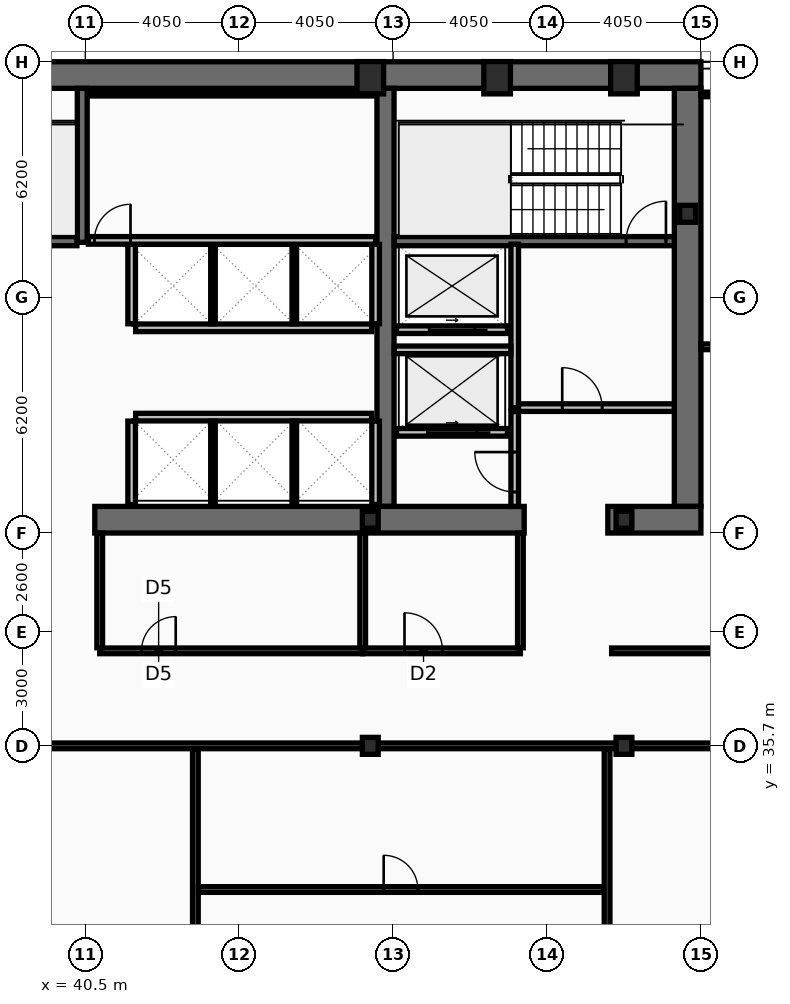
"""IFC4 building model, lengths in metres.
Left out: names, types, materials, properties, quantities, classifications, styles, units other than length and angle.
Written with IfcOpenShell. Run it as: python <this file> out.ifc"""

import sys

from ifc_helpers import new_model, si_unit, direction, frame, frame_2d, origin, origin_2d, place, context, subcontext, project, spatial, rectangle, hollow_rectangle, i_section, extrude, element, fill, save


model = new_model("IFC4")
c1 = context("Model", 3, precision=1e-05, world=origin(), true_north=direction((0.0, 1.0)))
c2 = subcontext(c1, "Body", "Model", "MODEL_VIEW")
j1 = project(units=[si_unit("LENGTHUNIT", "METRE"), si_unit("PLANEANGLEUNIT", "RADIAN")], contexts=[c1])
p1 = place(None, origin())
s1 = spatial("IfcSite", under=j1, at=p1, CompositionType="ELEMENT")
p2 = place(p1, origin())
s2 = spatial("IfcBuilding", under=s1, at=p2, CompositionType="ELEMENT")
p3 = place(p2, frame((0.0, 0.0, 136.2)))
s3 = spatial("IfcBuildingStorey", under=s2, at=p3, CompositionType="ELEMENT", Elevation=136.2)
p4 = place(p3, frame((16.2, 53.35, 0.0), z_axis=(0.0, 0.0, 1.0), x_axis=(1.0, 0.0, 0.0)))
e1 = element("IfcWall", 1, at=p4, inside=s3, PredefinedType="SHEAR", context=c2, shape_type="SweptSolid", body=[
    extrude(rectangle(XDim=40.5, YDim=0.7, at=frame_2d((20.25, 0.0))), origin(), (0.0, 0.0, 1.0), 3.44),
])
p5 = place(p3, frame((56.35, 53.0, 0.0), z_axis=(0.0, 0.0, 1.0), x_axis=(0.0, -1.0, 0.0)))
e2 = element("IfcWall", 2, at=p5, inside=s3, PredefinedType="SHEAR", context=c2, shape_type="SweptSolid", body=[
    extrude(rectangle(XDim=11.0, YDim=0.7, at=frame_2d((5.5, 0.0))), origin(), (0.0, 0.0, 1.0), 3.44),
])
p6 = place(p3, frame((48.4, 42.0, 0.0), z_axis=(0.0, 0.0, 1.0), x_axis=(0.0, 1.0, 0.0)))
e3 = element("IfcWall", 3, at=p6, inside=s3, PredefinedType="SHEAR", context=c2, shape_type="SweptSolid", body=[
    extrude(rectangle(XDim=11.0, YDim=0.45, at=frame_2d((5.5, 0.0))), origin(), (0.0, 0.0, 1.0), 3.44),
])
p7 = place(p3, frame((52.05, 41.65, 0.0), z_axis=(0.0, 0.0, 1.0), x_axis=(-1.0, 0.0, 0.0)))
e4 = element("IfcWall", 4, at=p7, inside=s3, PredefinedType="SHEAR", context=c2, shape_type="SweptSolid", body=[
    extrude(rectangle(XDim=11.3, YDim=0.7, at=frame_2d((5.65, 0.0))), origin(), (0.0, 0.0, 1.0), 3.44),
])
p8 = place(p3, frame((56.7, 41.65, 0.0), z_axis=(0.0, 0.0, 1.0), x_axis=(-1.0, 0.0, 0.0)))
e5 = element("IfcWall", 5, at=p8, inside=s3, PredefinedType="SHEAR", context=c2, shape_type="SweptSolid", body=[
    extrude(rectangle(XDim=2.45, YDim=0.7, at=frame_2d((1.225, 0.0))), origin(), (0.0, 0.0, 1.0), 3.44),
])
p9 = place(p3, frame((40.42, 48.95, 0.0), z_axis=(0.0, 0.0, 1.0), x_axis=(0.0, 1.0, 0.0)))
e6 = element("IfcWall", 6, at=p9, inside=s3, PredefinedType="SHEAR", context=c2, shape_type="SweptSolid", body=[
    extrude(rectangle(XDim=4.05, YDim=0.26, at=frame_2d((2.025, 0.0))), origin(), (0.0, 0.0, 1.0), 3.44),
])
p10 = place(p3, frame((48.63, 48.98, 0.0), z_axis=(0.0, 0.0, 1.0), x_axis=(1.0, 0.0, 0.0)))
e7 = element("IfcWall", 7, at=p10, inside=s3, PredefinedType="SHEAR", context=c2, shape_type="SweptSolid", body=[
    extrude(rectangle(XDim=7.37, YDim=0.24, at=frame_2d((3.685, 0.0))), origin(), (0.0, 0.0, 1.0), 3.44),
])
p11 = place(p10, frame((6.1, 0.0, 0.0)))
e8 = element("IfcOpeningElement", 8, at=p11, cuts=e7, PredefinedType="OPENING", context=c2, shape_type="SweptSolid", body=[
    extrude(rectangle(XDim=1.05, YDim=2.15, at=frame_2d((0.525, 1.075))), frame((0.0, 0.13, 0.0), z_axis=(0.0, -1.0, 0.0), x_axis=(1.0, 0.0, 0.0)), (0.0, 0.0, 1.0), 0.26),
])
p12 = place(p3, frame((32.72, 48.98, 0.0), z_axis=(0.0, 0.0, 1.0), x_axis=(1.0, 0.0, 0.0)))
e9 = element("IfcWall", 9, at=p12, inside=s3, PredefinedType="SHEAR", context=c2, shape_type="SweptSolid", body=[
    extrude(rectangle(XDim=7.56, YDim=0.24, at=frame_2d((3.78, 0.0))), origin(), (0.0, 0.0, 1.0), 3.44),
])
p13 = place(p12, frame((0.22, 0.0, 0.0)))
e10 = element("IfcOpeningElement", 10, at=p13, cuts=e9, PredefinedType="OPENING", context=c2, shape_type="SweptSolid", body=[
    extrude(rectangle(XDim=1.05, YDim=2.15, at=frame_2d((0.525, 1.075))), frame((0.0, 0.13, 0.0), z_axis=(0.0, -1.0, 0.0), x_axis=(1.0, 0.0, 0.0)), (0.0, 0.0, 1.0), 0.26),
])
for number, where, z_axis, x_axis in (
    (11, (48.0, 53.28, 0.0), (0.0, 0.0, 1.0), (1.0, 0.0, 0.0)),
    (12, (51.337, 53.28, 0.0), (0.0, 0.0, 1.0), (1.0, 0.0, 0.0)),
    (13, (54.675, 53.28, 0.0), (0.0, 0.0, 1.0), (1.0, 0.0, 0.0)),
):
    element("IfcColumn", number, at=place(p3, frame(where, z_axis=z_axis, x_axis=x_axis)), inside=s3, PredefinedType="COLUMN", context=c2, shape_type="SweptSolid", body=[
        extrude(hollow_rectangle(XDim=0.7, YDim=0.85, WallThickness=0.05, at=origin_2d()), origin(), (0.0, 0.0, 1.0), 3.6),
    ])
for number, where, z_axis, x_axis in (
    (14, (56.35, 49.7, 0.0), (0.0, 0.0, 1.0), (1.0, 0.0, 0.0)),
    (15, (48.0, 35.7, 0.0), (0.0, 0.0, 1.0), (1.0, 0.0, 0.0)),
    (16, (48.0, 41.65, 0.0), (0.0, 0.0, 1.0), (1.0, 0.0, 0.0)),
    (17, (54.675, 35.7, 0.0), (0.0, 0.0, 1.0), (1.0, 0.0, 0.0)),
    (18, (54.675, 41.65, 0.0), (0.0, 0.0, 1.0), (1.0, 0.0, 0.0)),
):
    element("IfcColumn", number, at=place(p3, frame(where, z_axis=z_axis, x_axis=x_axis)), inside=s3, PredefinedType="COLUMN", context=c2, shape_type="SweptSolid", body=[
        extrude(i_section(OverallWidth=0.416, OverallDepth=0.446, WebThickness=0.039, FlangeThickness=0.063, at=origin_2d()), origin(), (0.0, 0.0, 1.0), 3.6),
    ])
p14 = place(p3, frame((51.61, 43.95, 0.0), z_axis=(0.0, 0.0, 1.0), x_axis=(-1.0, 0.0, 0.0)))
e19 = element("IfcWall", 19, at=p14, inside=s3, PredefinedType="PARTITIONING", context=c2, shape_type="SweptSolid", body=[
    extrude(rectangle(XDim=2.92, YDim=0.2, at=frame_2d((1.46, 0.0))), origin(), (0.0, 0.0, 1.0), 3.44),
])
p15 = place(p14, frame((0.81, 0.0, 0.0)))
e20 = element("IfcOpeningElement", 20, at=p15, cuts=e19, PredefinedType="OPENING", context=c2, shape_type="SweptSolid", body=[
    extrude(rectangle(XDim=1.3, YDim=2.18, at=frame_2d((0.65, 1.09))), frame((0.0, 0.11, 0.0), z_axis=(0.0, -1.0, 0.0), x_axis=(1.0, 0.0, 0.0)), (0.0, 0.0, 1.0), 0.22),
])
p16 = place(p3, frame((51.61, 46.65, 0.0), z_axis=(0.0, 0.0, 1.0), x_axis=(-1.0, 0.0, 0.0)))
e21 = element("IfcWall", 21, at=p16, inside=s3, PredefinedType="PARTITIONING", context=c2, shape_type="SweptSolid", body=[
    extrude(rectangle(XDim=2.92, YDim=0.2, at=frame_2d((1.46, 0.0))), origin(), (0.0, 0.0, 1.0), 3.44),
])
p17 = place(p16, frame((0.86, 0.0, 0.0)))
e22 = element("IfcOpeningElement", 22, at=p17, cuts=e21, PredefinedType="OPENING", context=c2, shape_type="SweptSolid", body=[
    extrude(rectangle(XDim=1.2, YDim=2.18, at=frame_2d((0.6, 1.09))), frame((0.0, 0.11, 0.0), z_axis=(0.0, -1.0, 0.0), x_axis=(1.0, 0.0, 0.0)), (0.0, 0.0, 1.0), 0.22),
])
p18 = place(p3, frame((51.8, 44.6, 0.0), z_axis=(0.0, 0.0, 1.0), x_axis=(0.0, 1.0, 0.0)))
e23 = element("IfcWall", 23, at=p18, inside=s3, PredefinedType="PARTITIONING", context=c2, shape_type="SweptSolid", body=[
    extrude(rectangle(XDim=4.3, YDim=0.2, at=frame_2d((2.15, 0.0))), origin(), (0.0, 0.0, 1.0), 3.44),
])
p19 = place(p3, frame((51.9, 44.6, 0.0), z_axis=(0.0, 0.0, 1.0), x_axis=(1.0, 0.0, 0.0)))
e24 = element("IfcWall", 24, at=p19, inside=s3, PredefinedType="PARTITIONING", context=c2, shape_type="SweptSolid", body=[
    extrude(rectangle(XDim=4.1, YDim=0.2, at=frame_2d((2.05, 0.0))), origin(), (0.0, 0.0, 1.0), 3.44),
])
p20 = place(p19, frame((1.15, 0.0, 0.0)))
e25 = element("IfcOpeningElement", 25, at=p20, cuts=e24, PredefinedType="OPENING", context=c2, shape_type="SweptSolid", body=[
    extrude(rectangle(XDim=1.05, YDim=2.15, at=frame_2d((0.525, 1.075))), frame((0.0, 0.11, 0.0), z_axis=(0.0, -1.0, 0.0), x_axis=(1.0, 0.0, 0.0)), (0.0, 0.0, 1.0), 0.22),
])
p21 = place(p3, frame((48.63, 46.12, 0.0), z_axis=(0.0, 0.0, 1.0), x_axis=(1.0, 0.0, 0.0)))
e26 = element("IfcWall", 26, at=p21, inside=s3, PredefinedType="PARTITIONING", context=c2, shape_type="SweptSolid", body=[
    extrude(rectangle(XDim=3.07, YDim=0.2, at=frame_2d((1.535, 0.0))), origin(), (0.0, 0.0, 1.0), 3.44),
])
p22 = place(p3, frame((51.8, 42.0, 0.0), z_axis=(0.0, 0.0, 1.0), x_axis=(0.0, 1.0, 0.0)))
e27 = element("IfcWall", 27, at=p22, inside=s3, PredefinedType="PARTITIONING", context=c2, shape_type="SweptSolid", body=[
    extrude(rectangle(XDim=2.495, YDim=0.2, at=frame_2d((1.248, 0.0))), origin(), (0.0, 0.0, 1.0), 3.44),
])
p23 = place(p22, frame((0.38, 0.0, 0.0)))
e28 = element("IfcOpeningElement", 28, at=p23, cuts=e27, PredefinedType="OPENING", context=c2, shape_type="SweptSolid", body=[
    extrude(rectangle(XDim=1.05, YDim=2.15, at=frame_2d((0.525, 1.075))), frame((0.0, 0.11, 0.0), z_axis=(0.0, -1.0, 0.0), x_axis=(1.0, 0.0, 0.0)), (0.0, 0.0, 1.0), 0.22),
])
p24 = place(p3, frame((41.825, 46.7, 0.0), z_axis=(0.0, 0.0, 1.0), x_axis=(1.0, 0.0, 0.0)))
e29 = element("IfcWall", 29, at=p24, inside=s3, PredefinedType="PARTITIONING", context=c2, shape_type="SweptSolid", body=[
    extrude(rectangle(XDim=6.21, YDim=0.2, at=frame_2d((3.105, 0.0))), origin(), (0.0, 0.0, 1.0), 3.44),
])
for number, where, z_axis, x_axis in (
    (30, (41.72, 46.805, 0.0), (0.0, 0.0, 1.0), (0.0, 1.0, 0.0)),
    (31, (48.14, 46.805, 0.0), (0.0, 0.0, 1.0), (0.0, 1.0, 0.0)),
):
    element("IfcWall", number, at=place(p3, frame(where, z_axis=z_axis, x_axis=x_axis)), inside=s3, PredefinedType="PARTITIONING", context=c2, shape_type="SweptSolid", body=[
        extrude(rectangle(XDim=2.09, YDim=0.2, at=frame_2d((1.045, 0.0))), origin(), (0.0, 0.0, 1.0), 3.44),
    ])
for number, where, z_axis, x_axis in (
    (32, (43.86, 46.805, 0.0), (0.0, 0.0, 1.0), (0.0, 1.0, 0.0)),
    (33, (46.0, 46.805, 0.0), (0.0, 0.0, 1.0), (0.0, 1.0, 0.0)),
):
    element("IfcWall", number, at=place(p3, frame(where, z_axis=z_axis, x_axis=x_axis)), inside=s3, PredefinedType="PARTITIONING", context=c2, shape_type="SweptSolid", body=[
        extrude(rectangle(XDim=2.09, YDim=0.12, at=frame_2d((1.045, 0.0))), origin(), (0.0, 0.0, 1.0), 3.44),
    ])
p25 = place(p3, frame((41.825, 44.35, 0.0), z_axis=(0.0, 0.0, 1.0), x_axis=(1.0, 0.0, 0.0)))
e34 = element("IfcWall", 34, at=p25, inside=s3, PredefinedType="PARTITIONING", context=c2, shape_type="SweptSolid", body=[
    extrude(rectangle(XDim=6.21, YDim=0.2, at=frame_2d((3.105, 0.0))), origin(), (0.0, 0.0, 1.0), 3.44),
])
for number, where, z_axis, x_axis in (
    (35, (41.72, 42.05, 0.0), (0.0, 0.0, 1.0), (0.0, 1.0, 0.0)),
    (36, (48.14, 42.05, 0.0), (0.0, 0.0, 1.0), (0.0, 1.0, 0.0)),
):
    element("IfcWall", number, at=place(p3, frame(where, z_axis=z_axis, x_axis=x_axis)), inside=s3, PredefinedType="PARTITIONING", context=c2, shape_type="SweptSolid", body=[
        extrude(rectangle(XDim=2.195, YDim=0.2, at=frame_2d((1.098, 0.0))), origin(), (0.0, 0.0, 1.0), 3.44),
    ])
for number, where, z_axis, x_axis in (
    (37, (43.86, 42.05, 0.0), (0.0, 0.0, 1.0), (0.0, 1.0, 0.0)),
    (38, (46.0, 42.05, 0.0), (0.0, 0.0, 1.0), (0.0, 1.0, 0.0)),
):
    element("IfcWall", number, at=place(p3, frame(where, z_axis=z_axis, x_axis=x_axis)), inside=s3, PredefinedType="PARTITIONING", context=c2, shape_type="SweptSolid", body=[
        extrude(rectangle(XDim=2.195, YDim=0.12, at=frame_2d((1.098, 0.0))), origin(), (0.0, 0.0, 1.0), 3.44),
    ])
p26 = place(p3, frame((40.58, 52.86, 0.0), z_axis=(0.0, 0.0, 1.0), x_axis=(1.0, 0.0, 0.0)))
e39 = element("IfcWall", 39, at=p26, inside=s3, PredefinedType="PARTITIONING", context=c2, shape_type="SweptSolid", body=[
    extrude(rectangle(XDim=7.56, YDim=0.12, at=frame_2d((3.78, 0.0))), origin(), (0.0, 0.0, 1.0), 3.44),
])
p27 = place(p3, frame((40.58, 49.0, 0.0), z_axis=(0.0, 0.0, 1.0), x_axis=(1.0, 0.0, 0.0)))
e40 = element("IfcWall", 40, at=p27, inside=s3, PredefinedType="PARTITIONING", context=c2, shape_type="SweptSolid", body=[
    extrude(rectangle(XDim=7.56, YDim=0.2, at=frame_2d((3.78, 0.0))), origin(), (0.0, 0.0, 1.0), 3.44),
])
p28 = place(p27, frame((0.16, 0.0, 0.0)))
e41 = element("IfcOpeningElement", 41, at=p28, cuts=e40, PredefinedType="OPENING", context=c2, shape_type="SweptSolid", body=[
    extrude(rectangle(XDim=0.95, YDim=2.1, at=frame_2d((0.475, 1.05))), frame((0.0, 0.11, 0.0), z_axis=(0.0, -1.0, 0.0), x_axis=(1.0, 0.0, 0.0)), (0.0, 0.0, 1.0), 0.22),
])
p29 = place(p3, frame((40.88, 38.2, 0.0), z_axis=(0.0, 0.0, 1.0), x_axis=(1.0, 0.0, 0.0)))
e42 = element("IfcWall", 42, at=p29, inside=s3, PredefinedType="PARTITIONING", context=c2, shape_type="SweptSolid", body=[
    extrude(rectangle(XDim=6.92, YDim=0.15, at=frame_2d((3.46, 0.0))), origin(), (0.0, 0.0, 1.0), 2.73),
])
p30 = place(p29, frame((1.1, 0.0, 0.0)))
e43 = element("IfcOpeningElement", 43, at=p30, cuts=e42, PredefinedType="OPENING", context=c2, shape_type="SweptSolid", body=[
    extrude(rectangle(XDim=0.9, YDim=2.05, at=frame_2d((0.45, 1.025))), frame((0.0, 0.085, 0.0), z_axis=(0.0, -1.0, 0.0), x_axis=(1.0, 0.0, 0.0)), (0.0, 0.0, 1.0), 0.17),
])
p31 = place(p3, frame((47.8, 38.2, 0.0), z_axis=(0.0, 0.0, 1.0), x_axis=(1.0, 0.0, 0.0)))
e44 = element("IfcWall", 44, at=p31, inside=s3, PredefinedType="PARTITIONING", context=c2, shape_type="SweptSolid", body=[
    extrude(rectangle(XDim=4.15, YDim=0.15, at=frame_2d((2.075, 0.0))), origin(), (0.0, 0.0, 1.0), 2.73),
])
p32 = place(p31, frame((1.1, 0.0, 0.0)))
e45 = element("IfcOpeningElement", 45, at=p32, cuts=e44, PredefinedType="OPENING", context=c2, shape_type="SweptSolid", body=[
    extrude(rectangle(XDim=1.0, YDim=2.05, at=frame_2d((0.5, 1.025))), frame((0.0, 0.085, 0.0), z_axis=(0.0, -1.0, 0.0), x_axis=(1.0, 0.0, 0.0)), (0.0, 0.0, 1.0), 0.17),
])
p33 = place(p3, frame((40.88, 38.28, 0.0), z_axis=(0.0, 0.0, 1.0), x_axis=(0.0, 1.0, 0.0)))
e46 = element("IfcWall", 46, at=p33, inside=s3, PredefinedType="PARTITIONING", context=c2, shape_type="SweptSolid", body=[
    extrude(rectangle(XDim=3.02, YDim=0.15, at=frame_2d((1.51, 0.0))), origin(), (0.0, 0.0, 1.0), 3.44),
])
p34 = place(p3, frame((47.8, 38.28, 0.0), z_axis=(0.0, 0.0, 1.0), x_axis=(0.0, 1.0, 0.0)))
e47 = element("IfcWall", 47, at=p34, inside=s3, PredefinedType="PARTITIONING", context=c2, shape_type="SweptSolid", body=[
    extrude(rectangle(XDim=3.02, YDim=0.15, at=frame_2d((1.51, 0.0))), origin(), (0.0, 0.0, 1.0), 2.73),
])
p35 = place(p3, frame((51.95, 38.28, 0.0), z_axis=(0.0, 0.0, 1.0), x_axis=(0.0, 1.0, 0.0)))
e48 = element("IfcWall", 48, at=p35, inside=s3, PredefinedType="PARTITIONING", context=c2, shape_type="SweptSolid", body=[
    extrude(rectangle(XDim=3.02, YDim=0.15, at=frame_2d((1.51, 0.0))), origin(), (0.0, 0.0, 1.0), 3.44),
])
p36 = place(p3, frame((54.35, 38.2, 0.0), z_axis=(0.0, 0.0, 1.0), x_axis=(1.0, 0.0, 0.0)))
e49 = element("IfcWall", 49, at=p36, inside=s3, PredefinedType="PARTITIONING", context=c2, shape_type="SweptSolid", body=[
    extrude(rectangle(XDim=12.52, YDim=0.15, at=frame_2d((6.26, 0.0))), origin(), (0.0, 0.0, 1.0), 2.73),
])
p37 = place(p36, frame((3.25, 0.0, 0.0)))
e50 = element("IfcOpeningElement", 50, at=p37, cuts=e49, PredefinedType="OPENING", context=c2, shape_type="SweptSolid", body=[
    extrude(rectangle(XDim=0.95, YDim=2.05, at=frame_2d((0.475, 1.025))), frame((0.0, 0.085, 0.0), z_axis=(0.0, -1.0, 0.0), x_axis=(1.0, 0.0, 0.0)), (0.0, 0.0, 1.0), 0.17),
])
p38 = place(p3, frame((56.7, 46.2, 0.0), z_axis=(0.0, 0.0, 1.0), x_axis=(1.0, 0.0, 0.0)))
e51 = element("IfcWall", 51, at=p38, inside=s3, PredefinedType="PARTITIONING", context=c2, shape_type="SweptSolid", body=[
    extrude(rectangle(XDim=10.105, YDim=0.15, at=frame_2d((5.052, 0.0))), origin(), (0.0, 0.0, 1.0), 2.83),
])
p39 = place(p38, frame((0.9, 0.0, 0.0)))
e52 = element("IfcOpeningElement", 52, at=p39, cuts=e51, PredefinedType="OPENING", context=c2, shape_type="SweptSolid", body=[
    extrude(rectangle(XDim=0.9, YDim=2.05, at=frame_2d((0.45, 1.025))), frame((0.0, 0.085, 0.0), z_axis=(0.0, -1.0, 0.0), x_axis=(1.0, 0.0, 0.0)), (0.0, 0.0, 1.0), 0.17),
])
p40 = place(p3, frame((21.81, 35.7, 0.0), z_axis=(0.0, 0.0, 1.0), x_axis=(1.0, 0.0, 0.0)))
e53 = element("IfcWall", 53, at=p40, inside=s3, PredefinedType="PARTITIONING", context=c2, shape_type="SweptSolid", body=[
    extrude(rectangle(XDim=44.995, YDim=0.15, at=frame_2d((22.498, 0.0))), origin(), (0.0, 0.0, 1.0), 2.73),
])
p41 = place(p3, frame((43.397, 26.785, 0.0), z_axis=(0.0, 0.0, 1.0), x_axis=(0.0, 1.0, 0.0)))
e54 = element("IfcWall", 54, at=p41, inside=s3, PredefinedType="PARTITIONING", context=c2, shape_type="SweptSolid", body=[
    extrude(rectangle(XDim=8.835, YDim=0.15, at=frame_2d((4.417, 0.0))), origin(), (0.0, 0.0, 1.0), 2.93),
])
p42 = place(p3, frame((43.477, 31.92, 0.0), z_axis=(0.0, 0.0, 1.0), x_axis=(1.0, 0.0, 0.0)))
e55 = element("IfcWall", 55, at=p42, inside=s3, PredefinedType="PARTITIONING", context=c2, shape_type="SweptSolid", body=[
    extrude(rectangle(XDim=10.674, YDim=0.15, at=frame_2d((5.337, 0.0))), origin(), (0.0, 0.0, 1.0), 2.73),
])
p43 = place(p42, frame((4.875, 0.0, 0.0)))
e56 = element("IfcOpeningElement", 56, at=p43, cuts=e55, PredefinedType="OPENING", context=c2, shape_type="SweptSolid", body=[
    extrude(rectangle(XDim=0.9, YDim=2.05, at=frame_2d((0.45, 1.025))), frame((0.0, 0.085, 0.0), z_axis=(0.0, -1.0, 0.0), x_axis=(1.0, 0.0, 0.0)), (0.0, 0.0, 1.0), 0.17),
])
p44 = place(p3, frame((54.231, 26.785, 0.0), z_axis=(0.0, 0.0, 1.0), x_axis=(0.0, 1.0, 0.0)))
e57 = element("IfcWall", 57, at=p44, inside=s3, PredefinedType="PARTITIONING", context=c2, shape_type="SweptSolid", body=[
    extrude(rectangle(XDim=8.835, YDim=0.15, at=frame_2d((4.417, 0.0))), origin(), (0.0, 0.0, 1.0), 2.73),
])
p45 = place(p3, frame((56.7, 52.84, 0.0), z_axis=(0.0, 0.0, 1.0), x_axis=(1.0, 0.0, 0.0)))
e58 = element("IfcWall", 58, at=p45, inside=s3, PredefinedType="PARTITIONING", context=c2, shape_type="SweptSolid", body=[
    extrude(rectangle(XDim=10.105, YDim=0.12, at=frame_2d((5.052, 0.0))), origin(), (0.0, 0.0, 1.0), 3.44),
])
p46 = place(p11, origin())
e59 = element("IfcDoor", 59, at=p46, inside=s3, OperationType="SINGLE_SWING_RIGHT", PredefinedType="DOOR", context=c2, shape_type="SweptSolid", body=[
    extrude(rectangle(XDim=1.05, YDim=2.15, at=frame_2d((0.525, 1.075))), frame((0.0, 0.025, 0.0), z_axis=(0.0, -1.0, 0.0), x_axis=(1.0, 0.0, 0.0)), (0.0, 0.0, 1.0), 0.05),
])
fill(e8, e59)
p47 = place(p15, origin())
e60 = element("IfcDoor", 60, at=p47, inside=s3, OperationType="SLIDING_TO_LEFT", PredefinedType="DOOR", context=c2, shape_type="SweptSolid", body=[
    extrude(rectangle(XDim=1.3, YDim=2.18, at=frame_2d((0.65, 1.09))), frame((0.0, 0.025, 0.0), z_axis=(0.0, -1.0, 0.0), x_axis=(1.0, 0.0, 0.0)), (0.0, 0.0, 1.0), 0.05),
])
fill(e20, e60)
p48 = place(p17, origin())
e61 = element("IfcDoor", 61, at=p48, inside=s3, OperationType="SLIDING_TO_LEFT", PredefinedType="DOOR", context=c2, shape_type="SweptSolid", body=[
    extrude(rectangle(XDim=1.2, YDim=2.18, at=frame_2d((0.6, 1.09))), frame((0.0, 0.025, 0.0), z_axis=(0.0, -1.0, 0.0), x_axis=(1.0, 0.0, 0.0)), (0.0, 0.0, 1.0), 0.05),
])
fill(e22, e61)
p49 = place(p20, origin())
e62 = element("IfcDoor", 62, at=p49, inside=s3, OperationType="SINGLE_SWING_LEFT", PredefinedType="DOOR", context=c2, shape_type="SweptSolid", body=[
    extrude(rectangle(XDim=1.05, YDim=2.15, at=frame_2d((0.525, 1.075))), frame((0.0, 0.025, 0.0), z_axis=(0.0, -1.0, 0.0), x_axis=(1.0, 0.0, 0.0)), (0.0, 0.0, 1.0), 0.05),
])
fill(e25, e62)
p50 = place(p23, origin())
e63 = element("IfcDoor", 63, at=p50, inside=s3, OperationType="SINGLE_SWING_RIGHT", PredefinedType="DOOR", context=c2, shape_type="SweptSolid", body=[
    extrude(rectangle(XDim=1.05, YDim=2.15, at=frame_2d((0.525, 1.075))), frame((0.0, 0.025, 0.0), z_axis=(0.0, -1.0, 0.0), x_axis=(1.0, 0.0, 0.0)), (0.0, 0.0, 1.0), 0.05),
])
fill(e28, e63)
p51 = place(p28, origin())
e64 = element("IfcDoor", 64, at=p51, inside=s3, OperationType="SINGLE_SWING_RIGHT", PredefinedType="DOOR", context=c2, shape_type="SweptSolid", body=[
    extrude(rectangle(XDim=0.95, YDim=2.1, at=frame_2d((0.475, 1.05))), frame((0.0, 0.025, 0.0), z_axis=(0.0, -1.0, 0.0), x_axis=(1.0, 0.0, 0.0)), (0.0, 0.0, 1.0), 0.05),
])
fill(e41, e64)
p52 = place(p30, origin())
e65 = element("IfcDoor", 65, at=p52, inside=s3, OperationType="SINGLE_SWING_RIGHT", PredefinedType="DOOR", context=c2, shape_type="SweptSolid", body=[
    extrude(rectangle(XDim=0.9, YDim=2.05, at=frame_2d((0.45, 1.025))), frame((0.0, 0.025, 0.0), z_axis=(0.0, -1.0, 0.0), x_axis=(1.0, 0.0, 0.0)), (0.0, 0.0, 1.0), 0.05),
])
fill(e43, e65)
p53 = place(p32, origin())
e66 = element("IfcDoor", 66, at=p53, inside=s3, OperationType="SINGLE_SWING_LEFT", PredefinedType="DOOR", context=c2, shape_type="SweptSolid", body=[
    extrude(rectangle(XDim=1.0, YDim=2.05, at=frame_2d((0.5, 1.025))), frame((0.0, 0.025, 0.0), z_axis=(0.0, -1.0, 0.0), x_axis=(1.0, 0.0, 0.0)), (0.0, 0.0, 1.0), 0.05),
])
fill(e45, e66)
p54 = place(p43, origin())
e67 = element("IfcDoor", 67, at=p54, inside=s3, OperationType="SINGLE_SWING_LEFT", PredefinedType="DOOR", context=c2, shape_type="SweptSolid", body=[
    extrude(rectangle(XDim=0.9, YDim=2.05, at=frame_2d((0.45, 1.025))), frame((0.0, 0.025, 0.0), z_axis=(0.0, -1.0, 0.0), x_axis=(1.0, 0.0, 0.0)), (0.0, 0.0, 1.0), 0.05),
])
fill(e56, e67)
save(model, sys.argv[1])
